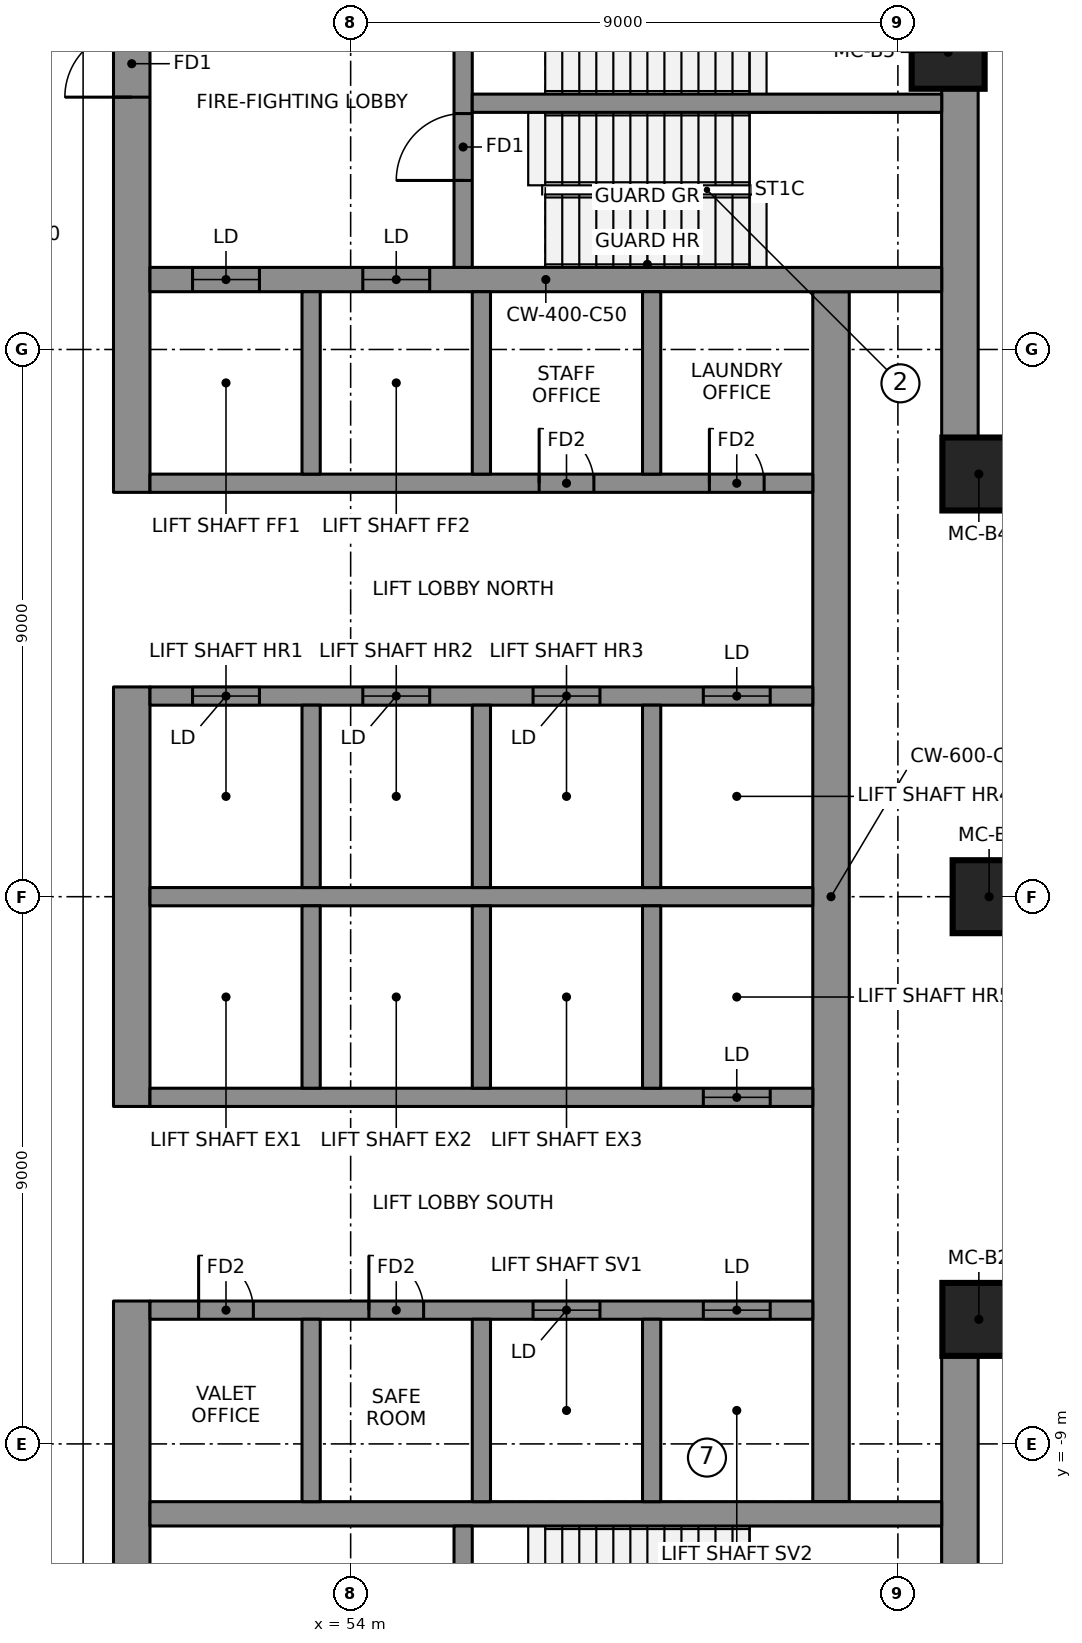
"""IFC4 building model, lengths in metres.
Left out: names, types, materials, properties, quantities, classifications, styles, units other than length and angle.
Written with IfcOpenShell. Run it as: python <this file> out.ifc"""

import sys

from ifc_helpers import new_model, si_unit, direction, frame, frame_2d, origin, origin_2d, place, context, subcontext, project, spatial, rectangle, extrude, element, fill, save


model = new_model("IFC4")
c1 = context("Model", 3, precision=1e-05, world=origin(), true_north=direction((0.0, 1.0)))
c2 = subcontext(c1, "Body", "Model", "MODEL_VIEW")
j1 = project(units=[si_unit("LENGTHUNIT", "METRE"), si_unit("PLANEANGLEUNIT", "RADIAN")], contexts=[c1])
p1 = place(None, origin())
s1 = spatial("IfcSite", under=j1, at=p1, CompositionType="ELEMENT")
p2 = place(p1, origin())
s2 = spatial("IfcBuilding", under=s1, at=p2, CompositionType="ELEMENT")
p3 = place(p2, frame((0.0, 0.0, 216.2)))
s3 = spatial("IfcBuildingStorey", under=s2, at=p3, CompositionType="ELEMENT", Elevation=216.2)
p4 = place(p3, frame((50.4, 6.65, 0.0), z_axis=(0.0, 0.0, 1.0), x_axis=(0.0, 1.0, 0.0)))
e1 = element("IfcWall", 1, at=p4, inside=s3, PredefinedType="SHEAR", context=c2, shape_type="SweptSolid", body=[
    extrude(rectangle(XDim=9.7, YDim=0.6, at=frame_2d((4.85, 0.0))), origin(), (0.0, 0.0, 1.0), 4.6),
])
p5 = place(p4, frame((6.5, 0.0, 0.0)))
e2 = element("IfcOpeningElement", 2, at=p5, cuts=e1, PredefinedType="OPENING", context=c2, shape_type="SweptSolid", body=[
    extrude(rectangle(XDim=1.1, YDim=2.1, at=frame_2d((0.55, 1.05))), frame((0.0, 0.31, 0.0), z_axis=(0.0, -1.0, 0.0), x_axis=(1.0, 0.0, 0.0)), (0.0, 0.0, 1.0), 0.62),
])
p6 = place(p3, frame((50.4, -3.45, 0.0), z_axis=(0.0, 0.0, 1.0), x_axis=(0.0, 1.0, 0.0)))
e3 = element("IfcWall", 3, at=p6, inside=s3, PredefinedType="SHEAR", context=c2, shape_type="SweptSolid", body=[
    extrude(rectangle(XDim=6.9, YDim=0.6, at=frame_2d((3.45, 0.0))), origin(), (0.0, 0.0, 1.0), 4.6),
])
p7 = place(p3, frame((50.4, -16.35, 0.0), z_axis=(0.0, 0.0, 1.0), x_axis=(0.0, 1.0, 0.0)))
e4 = element("IfcWall", 4, at=p7, inside=s3, PredefinedType="SHEAR", context=c2, shape_type="SweptSolid", body=[
    extrude(rectangle(XDim=9.7, YDim=0.6, at=frame_2d((4.85, 0.0))), origin(), (0.0, 0.0, 1.0), 4.6),
])
p8 = place(p7, frame((2.1, 0.0, 0.0)))
e5 = element("IfcOpeningElement", 5, at=p8, cuts=e4, PredefinedType="OPENING", context=c2, shape_type="SweptSolid", body=[
    extrude(rectangle(XDim=1.1, YDim=2.1, at=frame_2d((0.55, 1.05))), frame((0.0, 0.31, 0.0), z_axis=(0.0, -1.0, 0.0), x_axis=(1.0, 0.0, 0.0)), (0.0, 0.0, 1.0), 0.62),
])
for number, where, z_axis, x_axis in (
    (6, (64.02, 7.502, 0.0), (0.0, 0.0, 1.0), (0.0, 1.0, 0.0)),
    (7, (64.02, -15.75, 0.0), (0.0, 0.0, 1.0), (0.0, 1.0, 0.0)),
):
    element("IfcWall", number, at=place(p3, frame(where, z_axis=z_axis, x_axis=x_axis)), inside=s3, PredefinedType="SHEAR", context=c2, shape_type="SweptSolid", body=[
        extrude(rectangle(XDim=8.248, YDim=0.6, at=frame_2d((4.124, 0.0))), origin(), (0.0, 0.0, 1.0), 4.6),
    ])
p9 = place(p3, frame((61.9, -9.95, 0.0), z_axis=(0.0, 0.0, 1.0), x_axis=(0.0, 1.0, 0.0)))
e8 = element("IfcWall", 8, at=p9, inside=s3, PredefinedType="SHEAR", context=c2, shape_type="SweptSolid", body=[
    extrude(rectangle(XDim=19.9, YDim=0.6, at=frame_2d((9.95, 0.0))), origin(), (0.0, 0.0, 1.0), 4.6),
])
p10 = place(p3, frame((50.7, 10.15, 0.0), z_axis=(0.0, 0.0, 1.0), x_axis=(1.0, 0.0, 0.0)))
e9 = element("IfcWall", 9, at=p10, inside=s3, PredefinedType="SHEAR", context=c2, shape_type="SweptSolid", body=[
    extrude(rectangle(XDim=13.02, YDim=0.4, at=frame_2d((6.51, 0.0))), origin(), (0.0, 0.0, 1.0), 4.6),
])
p11 = place(p10, frame((0.7, 0.0, 0.0)))
e10 = element("IfcOpeningElement", 10, at=p11, cuts=e9, PredefinedType="OPENING", context=c2, shape_type="SweptSolid", body=[
    extrude(rectangle(XDim=1.1, YDim=2.1, at=frame_2d((0.55, 1.05))), frame((0.0, 0.21, 0.0), z_axis=(0.0, -1.0, 0.0), x_axis=(1.0, 0.0, 0.0)), (0.0, 0.0, 1.0), 0.42),
])
p12 = place(p10, frame((3.5, 0.0, 0.0)))
e11 = element("IfcOpeningElement", 11, at=p12, cuts=e9, PredefinedType="OPENING", context=c2, shape_type="SweptSolid", body=[
    extrude(rectangle(XDim=1.1, YDim=2.1, at=frame_2d((0.55, 1.05))), frame((0.0, 0.21, 0.0), z_axis=(0.0, -1.0, 0.0), x_axis=(1.0, 0.0, 0.0)), (0.0, 0.0, 1.0), 0.42),
])
p13 = place(p3, frame((50.7, -10.15, 0.0), z_axis=(0.0, 0.0, 1.0), x_axis=(1.0, 0.0, 0.0)))
e12 = element("IfcWall", 12, at=p13, inside=s3, PredefinedType="SHEAR", context=c2, shape_type="SweptSolid", body=[
    extrude(rectangle(XDim=13.02, YDim=0.4, at=frame_2d((6.51, 0.0))), origin(), (0.0, 0.0, 1.0), 4.6),
])
p14 = place(p3, frame((50.7, 0.0, 0.0), z_axis=(0.0, 0.0, 1.0), x_axis=(1.0, 0.0, 0.0)))
e13 = element("IfcWall", 13, at=p14, inside=s3, PredefinedType="SHEAR", context=c2, shape_type="SweptSolid", body=[
    extrude(rectangle(XDim=10.9, YDim=0.3, at=frame_2d((5.45, 0.0))), origin(), (0.0, 0.0, 1.0), 4.6),
])
p15 = place(p3, frame((50.7, 3.3, 0.0), z_axis=(0.0, 0.0, 1.0), x_axis=(1.0, 0.0, 0.0)))
e14 = element("IfcWall", 14, at=p15, inside=s3, PredefinedType="SHEAR", context=c2, shape_type="SweptSolid", body=[
    extrude(rectangle(XDim=10.9, YDim=0.3, at=frame_2d((5.45, 0.0))), origin(), (0.0, 0.0, 1.0), 4.6),
])
p16 = place(p15, frame((0.7, 0.0, 0.0)))
e15 = element("IfcOpeningElement", 15, at=p16, cuts=e14, PredefinedType="OPENING", context=c2, shape_type="SweptSolid", body=[
    extrude(rectangle(XDim=1.1, YDim=2.1, at=frame_2d((0.55, 1.05))), frame((0.0, 0.16, 0.0), z_axis=(0.0, -1.0, 0.0), x_axis=(1.0, 0.0, 0.0)), (0.0, 0.0, 1.0), 0.32),
])
p17 = place(p15, frame((3.5, 0.0, 0.0)))
e16 = element("IfcOpeningElement", 16, at=p17, cuts=e14, PredefinedType="OPENING", context=c2, shape_type="SweptSolid", body=[
    extrude(rectangle(XDim=1.1, YDim=2.1, at=frame_2d((0.55, 1.05))), frame((0.0, 0.16, 0.0), z_axis=(0.0, -1.0, 0.0), x_axis=(1.0, 0.0, 0.0)), (0.0, 0.0, 1.0), 0.32),
])
p18 = place(p15, frame((6.3, 0.0, 0.0)))
e17 = element("IfcOpeningElement", 17, at=p18, cuts=e14, PredefinedType="OPENING", context=c2, shape_type="SweptSolid", body=[
    extrude(rectangle(XDim=1.1, YDim=2.1, at=frame_2d((0.55, 1.05))), frame((0.0, 0.16, 0.0), z_axis=(0.0, -1.0, 0.0), x_axis=(1.0, 0.0, 0.0)), (0.0, 0.0, 1.0), 0.32),
])
p19 = place(p15, frame((9.1, 0.0, 0.0)))
e18 = element("IfcOpeningElement", 18, at=p19, cuts=e14, PredefinedType="OPENING", context=c2, shape_type="SweptSolid", body=[
    extrude(rectangle(XDim=1.1, YDim=2.1, at=frame_2d((0.55, 1.05))), frame((0.0, 0.16, 0.0), z_axis=(0.0, -1.0, 0.0), x_axis=(1.0, 0.0, 0.0)), (0.0, 0.0, 1.0), 0.32),
])
p20 = place(p3, frame((50.7, 6.8, 0.0), z_axis=(0.0, 0.0, 1.0), x_axis=(1.0, 0.0, 0.0)))
e19 = element("IfcWall", 19, at=p20, inside=s3, PredefinedType="SHEAR", context=c2, shape_type="SweptSolid", body=[
    extrude(rectangle(XDim=10.9, YDim=0.3, at=frame_2d((5.45, 0.0))), origin(), (0.0, 0.0, 1.0), 4.6),
])
p21 = place(p20, frame((6.4, 0.0, 0.0)))
e20 = element("IfcOpeningElement", 20, at=p21, cuts=e19, PredefinedType="OPENING", context=c2, shape_type="SweptSolid", body=[
    extrude(rectangle(XDim=0.9, YDim=2.1, at=frame_2d((0.45, 1.05))), frame((0.0, 0.16, 0.0), z_axis=(0.0, -1.0, 0.0), x_axis=(1.0, 0.0, 0.0)), (0.0, 0.0, 1.0), 0.32),
])
p22 = place(p20, frame((9.2, 0.0, 0.0)))
e21 = element("IfcOpeningElement", 21, at=p22, cuts=e19, PredefinedType="OPENING", context=c2, shape_type="SweptSolid", body=[
    extrude(rectangle(XDim=0.9, YDim=2.1, at=frame_2d((0.45, 1.05))), frame((0.0, 0.16, 0.0), z_axis=(0.0, -1.0, 0.0), x_axis=(1.0, 0.0, 0.0)), (0.0, 0.0, 1.0), 0.32),
])
for number, where, z_axis, x_axis in (
    (22, (53.35, 0.15, 0.0), (0.0, 0.0, 1.0), (0.0, 1.0, 0.0)),
    (23, (53.35, 6.95, 0.0), (0.0, 0.0, 1.0), (0.0, 1.0, 0.0)),
    (24, (56.15, 0.15, 0.0), (0.0, 0.0, 1.0), (0.0, 1.0, 0.0)),
    (25, (56.15, 6.95, 0.0), (0.0, 0.0, 1.0), (0.0, 1.0, 0.0)),
    (26, (58.95, 0.15, 0.0), (0.0, 0.0, 1.0), (0.0, 1.0, 0.0)),
    (27, (58.95, 6.95, 0.0), (0.0, 0.0, 1.0), (0.0, 1.0, 0.0)),
):
    element("IfcWall", number, at=place(p3, frame(where, z_axis=z_axis, x_axis=x_axis)), inside=s3, PredefinedType="SHEAR", context=c2, shape_type="SweptSolid", body=[
        extrude(rectangle(XDim=3.0, YDim=0.3, at=frame_2d((1.5, 0.0))), origin(), (0.0, 0.0, 1.0), 4.6),
    ])
p23 = place(p3, frame((50.7, -3.3, 0.0), z_axis=(0.0, 0.0, 1.0), x_axis=(1.0, 0.0, 0.0)))
e28 = element("IfcWall", 28, at=p23, inside=s3, PredefinedType="SHEAR", context=c2, shape_type="SweptSolid", body=[
    extrude(rectangle(XDim=10.9, YDim=0.3, at=frame_2d((5.45, 0.0))), origin(), (0.0, 0.0, 1.0), 4.6),
])
p24 = place(p23, frame((9.1, 0.0, 0.0)))
e29 = element("IfcOpeningElement", 29, at=p24, cuts=e28, PredefinedType="OPENING", context=c2, shape_type="SweptSolid", body=[
    extrude(rectangle(XDim=1.1, YDim=2.1, at=frame_2d((0.55, 1.05))), frame((0.0, 0.16, 0.0), z_axis=(0.0, -1.0, 0.0), x_axis=(1.0, 0.0, 0.0)), (0.0, 0.0, 1.0), 0.32),
])
p25 = place(p3, frame((50.7, -6.8, 0.0), z_axis=(0.0, 0.0, 1.0), x_axis=(1.0, 0.0, 0.0)))
e30 = element("IfcWall", 30, at=p25, inside=s3, PredefinedType="SHEAR", context=c2, shape_type="SweptSolid", body=[
    extrude(rectangle(XDim=10.9, YDim=0.3, at=frame_2d((5.45, 0.0))), origin(), (0.0, 0.0, 1.0), 4.6),
])
p26 = place(p25, frame((6.3, 0.0, 0.0)))
e31 = element("IfcOpeningElement", 31, at=p26, cuts=e30, PredefinedType="OPENING", context=c2, shape_type="SweptSolid", body=[
    extrude(rectangle(XDim=1.1, YDim=2.1, at=frame_2d((0.55, 1.05))), frame((0.0, 0.16, 0.0), z_axis=(0.0, -1.0, 0.0), x_axis=(1.0, 0.0, 0.0)), (0.0, 0.0, 1.0), 0.32),
])
p27 = place(p25, frame((9.1, 0.0, 0.0)))
e32 = element("IfcOpeningElement", 32, at=p27, cuts=e30, PredefinedType="OPENING", context=c2, shape_type="SweptSolid", body=[
    extrude(rectangle(XDim=1.1, YDim=2.1, at=frame_2d((0.55, 1.05))), frame((0.0, 0.16, 0.0), z_axis=(0.0, -1.0, 0.0), x_axis=(1.0, 0.0, 0.0)), (0.0, 0.0, 1.0), 0.32),
])
p28 = place(p25, frame((0.8, 0.0, 0.0)))
e33 = element("IfcOpeningElement", 33, at=p28, cuts=e30, PredefinedType="OPENING", context=c2, shape_type="SweptSolid", body=[
    extrude(rectangle(XDim=0.9, YDim=2.1, at=frame_2d((0.45, 1.05))), frame((0.0, 0.16, 0.0), z_axis=(0.0, -1.0, 0.0), x_axis=(1.0, 0.0, 0.0)), (0.0, 0.0, 1.0), 0.32),
])
p29 = place(p25, frame((3.6, 0.0, 0.0)))
e34 = element("IfcOpeningElement", 34, at=p29, cuts=e30, PredefinedType="OPENING", context=c2, shape_type="SweptSolid", body=[
    extrude(rectangle(XDim=0.9, YDim=2.1, at=frame_2d((0.45, 1.05))), frame((0.0, 0.16, 0.0), z_axis=(0.0, -1.0, 0.0), x_axis=(1.0, 0.0, 0.0)), (0.0, 0.0, 1.0), 0.32),
])
for number, where, z_axis, x_axis in (
    (35, (53.35, -3.15, 0.0), (0.0, 0.0, 1.0), (0.0, 1.0, 0.0)),
    (36, (53.35, -9.95, 0.0), (0.0, 0.0, 1.0), (0.0, 1.0, 0.0)),
    (37, (56.15, -3.15, 0.0), (0.0, 0.0, 1.0), (0.0, 1.0, 0.0)),
    (38, (56.15, -9.95, 0.0), (0.0, 0.0, 1.0), (0.0, 1.0, 0.0)),
    (39, (58.95, -3.15, 0.0), (0.0, 0.0, 1.0), (0.0, 1.0, 0.0)),
    (40, (58.95, -9.95, 0.0), (0.0, 0.0, 1.0), (0.0, 1.0, 0.0)),
):
    element("IfcWall", number, at=place(p3, frame(where, z_axis=z_axis, x_axis=x_axis)), inside=s3, PredefinedType="SHEAR", context=c2, shape_type="SweptSolid", body=[
        extrude(rectangle(XDim=3.0, YDim=0.3, at=frame_2d((1.5, 0.0))), origin(), (0.0, 0.0, 1.0), 4.6),
    ])
p30 = place(p3, frame((55.85, 10.35, 0.0), z_axis=(0.0, 0.0, 1.0), x_axis=(0.0, 1.0, 0.0)))
e41 = element("IfcWall", 41, at=p30, inside=s3, PredefinedType="SHEAR", context=c2, shape_type="SweptSolid", body=[
    extrude(rectangle(XDim=5.4, YDim=0.3, at=frame_2d((2.7, 0.0))), origin(), (0.0, 0.0, 1.0), 4.6),
])
p31 = place(p30, frame((1.43, 0.0, 0.0)))
e42 = element("IfcOpeningElement", 42, at=p31, cuts=e41, PredefinedType="OPENING", context=c2, shape_type="SweptSolid", body=[
    extrude(rectangle(XDim=1.1, YDim=2.1, at=frame_2d((0.55, 1.05))), frame((0.0, 0.16, 0.0), z_axis=(0.0, -1.0, 0.0), x_axis=(1.0, 0.0, 0.0)), (0.0, 0.0, 1.0), 0.32),
])
p32 = place(p30, frame((3.6, 0.0, 0.0)))
e43 = element("IfcOpeningElement", 43, at=p32, cuts=e41, PredefinedType="OPENING", context=c2, shape_type="SweptSolid", body=[
    extrude(rectangle(XDim=1.1, YDim=2.1, at=frame_2d((0.55, 1.05))), frame((0.0, 0.16, 0.0), z_axis=(0.0, -1.0, 0.0), x_axis=(1.0, 0.0, 0.0)), (0.0, 0.0, 1.0), 0.32),
])
p33 = place(p3, frame((55.85, -15.75, 0.0), z_axis=(0.0, 0.0, 1.0), x_axis=(0.0, 1.0, 0.0)))
e44 = element("IfcWall", 44, at=p33, inside=s3, PredefinedType="SHEAR", context=c2, shape_type="SweptSolid", body=[
    extrude(rectangle(XDim=5.4, YDim=0.3, at=frame_2d((2.7, 0.0))), origin(), (0.0, 0.0, 1.0), 4.6),
])
p34 = place(p33, frame((3.6, 0.0, 0.0)))
e45 = element("IfcOpeningElement", 45, at=p34, cuts=e44, PredefinedType="OPENING", context=c2, shape_type="SweptSolid", body=[
    extrude(rectangle(XDim=1.1, YDim=2.1, at=frame_2d((0.55, 1.05))), frame((0.0, 0.16, 0.0), z_axis=(0.0, -1.0, 0.0), x_axis=(1.0, 0.0, 0.0)), (0.0, 0.0, 1.0), 0.32),
])
p35 = place(p33, frame((0.8, 0.0, 0.0)))
e46 = element("IfcOpeningElement", 46, at=p35, cuts=e44, PredefinedType="OPENING", context=c2, shape_type="SweptSolid", body=[
    extrude(rectangle(XDim=0.9, YDim=2.1, at=frame_2d((0.45, 1.05))), frame((0.0, 0.16, 0.0), z_axis=(0.0, -1.0, 0.0), x_axis=(1.0, 0.0, 0.0)), (0.0, 0.0, 1.0), 0.32),
])
p36 = place(p3, frame((56.0, 13.05, 0.0), z_axis=(0.0, 0.0, 1.0), x_axis=(1.0, 0.0, 0.0)))
e47 = element("IfcWall", 47, at=p36, inside=s3, PredefinedType="SHEAR", context=c2, shape_type="SweptSolid", body=[
    extrude(rectangle(XDim=7.72, YDim=0.3, at=frame_2d((3.86, 0.0))), origin(), (0.0, 0.0, 1.0), 4.6),
])
for number, where, z_axis, x_axis in (
    (48, (64.332, -6.952, 0.0), (0.0, 0.0, 1.0), (1.0, 0.0, 0.0)),
    (49, (64.5, 0.0, 0.0), (0.0, 0.0, 1.0), (1.0, 0.0, 0.0)),
    (50, (64.332, 6.952, 0.0), (0.0, 0.0, 1.0), (1.0, 0.0, 0.0)),
    (51, (63.826, 13.888, 0.0), (0.0, 0.0, 1.0), (1.0, 0.0, 0.0)),
):
    element("IfcColumn", number, at=place(p3, frame(where, z_axis=z_axis, x_axis=x_axis)), inside=s3, PredefinedType="COLUMN", context=c2, shape_type="SweptSolid", body=[
        extrude(rectangle(XDim=1.2, YDim=1.2, at=origin_2d()), origin(), (0.0, 0.0, 1.0), 4.6),
    ])
p37 = place(p11, origin())
e52 = element("IfcDoor", 52, at=p37, inside=s3, OperationType="DOUBLE_DOOR_SLIDING", PredefinedType="DOOR", context=c2, shape_type="SweptSolid", body=[
    extrude(rectangle(XDim=1.1, YDim=2.1, at=frame_2d((0.55, 1.05))), frame((0.0, 0.025, 0.0), z_axis=(0.0, -1.0, 0.0), x_axis=(1.0, 0.0, 0.0)), (0.0, 0.0, 1.0), 0.05),
])
fill(e10, e52)
p38 = place(p12, origin())
e53 = element("IfcDoor", 53, at=p38, inside=s3, OperationType="DOUBLE_DOOR_SLIDING", PredefinedType="DOOR", context=c2, shape_type="SweptSolid", body=[
    extrude(rectangle(XDim=1.1, YDim=2.1, at=frame_2d((0.55, 1.05))), frame((0.0, 0.025, 0.0), z_axis=(0.0, -1.0, 0.0), x_axis=(1.0, 0.0, 0.0)), (0.0, 0.0, 1.0), 0.05),
])
fill(e11, e53)
p39 = place(p16, origin())
e54 = element("IfcDoor", 54, at=p39, inside=s3, OperationType="DOUBLE_DOOR_SLIDING", PredefinedType="DOOR", context=c2, shape_type="SweptSolid", body=[
    extrude(rectangle(XDim=1.1, YDim=2.1, at=frame_2d((0.55, 1.05))), frame((0.0, 0.025, 0.0), z_axis=(0.0, -1.0, 0.0), x_axis=(1.0, 0.0, 0.0)), (0.0, 0.0, 1.0), 0.05),
])
fill(e15, e54)
p40 = place(p17, origin())
e55 = element("IfcDoor", 55, at=p40, inside=s3, OperationType="DOUBLE_DOOR_SLIDING", PredefinedType="DOOR", context=c2, shape_type="SweptSolid", body=[
    extrude(rectangle(XDim=1.1, YDim=2.1, at=frame_2d((0.55, 1.05))), frame((0.0, 0.025, 0.0), z_axis=(0.0, -1.0, 0.0), x_axis=(1.0, 0.0, 0.0)), (0.0, 0.0, 1.0), 0.05),
])
fill(e16, e55)
p41 = place(p18, origin())
e56 = element("IfcDoor", 56, at=p41, inside=s3, OperationType="DOUBLE_DOOR_SLIDING", PredefinedType="DOOR", context=c2, shape_type="SweptSolid", body=[
    extrude(rectangle(XDim=1.1, YDim=2.1, at=frame_2d((0.55, 1.05))), frame((0.0, 0.025, 0.0), z_axis=(0.0, -1.0, 0.0), x_axis=(1.0, 0.0, 0.0)), (0.0, 0.0, 1.0), 0.05),
])
fill(e17, e56)
p42 = place(p19, origin())
e57 = element("IfcDoor", 57, at=p42, inside=s3, OperationType="DOUBLE_DOOR_SLIDING", PredefinedType="DOOR", context=c2, shape_type="SweptSolid", body=[
    extrude(rectangle(XDim=1.1, YDim=2.1, at=frame_2d((0.55, 1.05))), frame((0.0, 0.025, 0.0), z_axis=(0.0, -1.0, 0.0), x_axis=(1.0, 0.0, 0.0)), (0.0, 0.0, 1.0), 0.05),
])
fill(e18, e57)
p43 = place(p24, origin())
e58 = element("IfcDoor", 58, at=p43, inside=s3, OperationType="DOUBLE_DOOR_SLIDING", PredefinedType="DOOR", context=c2, shape_type="SweptSolid", body=[
    extrude(rectangle(XDim=1.1, YDim=2.1, at=frame_2d((0.55, 1.05))), frame((0.0, 0.025, 0.0), z_axis=(0.0, -1.0, 0.0), x_axis=(1.0, 0.0, 0.0)), (0.0, 0.0, 1.0), 0.05),
])
fill(e29, e58)
p44 = place(p26, origin())
e59 = element("IfcDoor", 59, at=p44, inside=s3, OperationType="DOUBLE_DOOR_SLIDING", PredefinedType="DOOR", context=c2, shape_type="SweptSolid", body=[
    extrude(rectangle(XDim=1.1, YDim=2.1, at=frame_2d((0.55, 1.05))), frame((0.0, 0.025, 0.0), z_axis=(0.0, -1.0, 0.0), x_axis=(1.0, 0.0, 0.0)), (0.0, 0.0, 1.0), 0.05),
])
fill(e31, e59)
p45 = place(p27, origin())
e60 = element("IfcDoor", 60, at=p45, inside=s3, OperationType="DOUBLE_DOOR_SLIDING", PredefinedType="DOOR", context=c2, shape_type="SweptSolid", body=[
    extrude(rectangle(XDim=1.1, YDim=2.1, at=frame_2d((0.55, 1.05))), frame((0.0, 0.025, 0.0), z_axis=(0.0, -1.0, 0.0), x_axis=(1.0, 0.0, 0.0)), (0.0, 0.0, 1.0), 0.05),
])
fill(e32, e60)
p46 = place(p31, origin())
e61 = element("IfcDoor", 61, at=p46, inside=s3, OperationType="SINGLE_SWING_RIGHT", PredefinedType="DOOR", context=c2, shape_type="SweptSolid", body=[
    extrude(rectangle(XDim=1.1, YDim=2.1, at=frame_2d((0.55, 1.05))), frame((0.0, 0.025, 0.0), z_axis=(0.0, -1.0, 0.0), x_axis=(1.0, 0.0, 0.0)), (0.0, 0.0, 1.0), 0.05),
])
fill(e42, e61)
p47 = place(p5, origin())
e62 = element("IfcDoor", 62, at=p47, inside=s3, OperationType="SINGLE_SWING_RIGHT", PredefinedType="DOOR", context=c2, shape_type="SweptSolid", body=[
    extrude(rectangle(XDim=1.1, YDim=2.1, at=frame_2d((0.55, 1.05))), frame((0.0, 0.025, 0.0), z_axis=(0.0, -1.0, 0.0), x_axis=(1.0, 0.0, 0.0)), (0.0, 0.0, 1.0), 0.05),
])
fill(e2, e62)
p48 = place(p21, origin())
e63 = element("IfcDoor", 63, at=p48, inside=s3, OperationType="SINGLE_SWING_LEFT", PredefinedType="DOOR", context=c2, shape_type="SweptSolid", body=[
    extrude(rectangle(XDim=0.9, YDim=2.1, at=frame_2d((0.45, 1.05))), frame((0.0, 0.025, 0.0), z_axis=(0.0, -1.0, 0.0), x_axis=(1.0, 0.0, 0.0)), (0.0, 0.0, 1.0), 0.05),
])
fill(e20, e63)
p49 = place(p22, origin())
e64 = element("IfcDoor", 64, at=p49, inside=s3, OperationType="SINGLE_SWING_LEFT", PredefinedType="DOOR", context=c2, shape_type="SweptSolid", body=[
    extrude(rectangle(XDim=0.9, YDim=2.1, at=frame_2d((0.45, 1.05))), frame((0.0, 0.025, 0.0), z_axis=(0.0, -1.0, 0.0), x_axis=(1.0, 0.0, 0.0)), (0.0, 0.0, 1.0), 0.05),
])
fill(e21, e64)
p50 = place(p28, origin())
e65 = element("IfcDoor", 65, at=p50, inside=s3, OperationType="SINGLE_SWING_LEFT", PredefinedType="DOOR", context=c2, shape_type="SweptSolid", body=[
    extrude(rectangle(XDim=0.9, YDim=2.1, at=frame_2d((0.45, 1.05))), frame((0.0, 0.025, 0.0), z_axis=(0.0, -1.0, 0.0), x_axis=(1.0, 0.0, 0.0)), (0.0, 0.0, 1.0), 0.05),
])
fill(e33, e65)
p51 = place(p29, origin())
e66 = element("IfcDoor", 66, at=p51, inside=s3, OperationType="SINGLE_SWING_LEFT", PredefinedType="DOOR", context=c2, shape_type="SweptSolid", body=[
    extrude(rectangle(XDim=0.9, YDim=2.1, at=frame_2d((0.45, 1.05))), frame((0.0, 0.025, 0.0), z_axis=(0.0, -1.0, 0.0), x_axis=(1.0, 0.0, 0.0)), (0.0, 0.0, 1.0), 0.05),
])
fill(e34, e66)
save(model, sys.argv[1])
